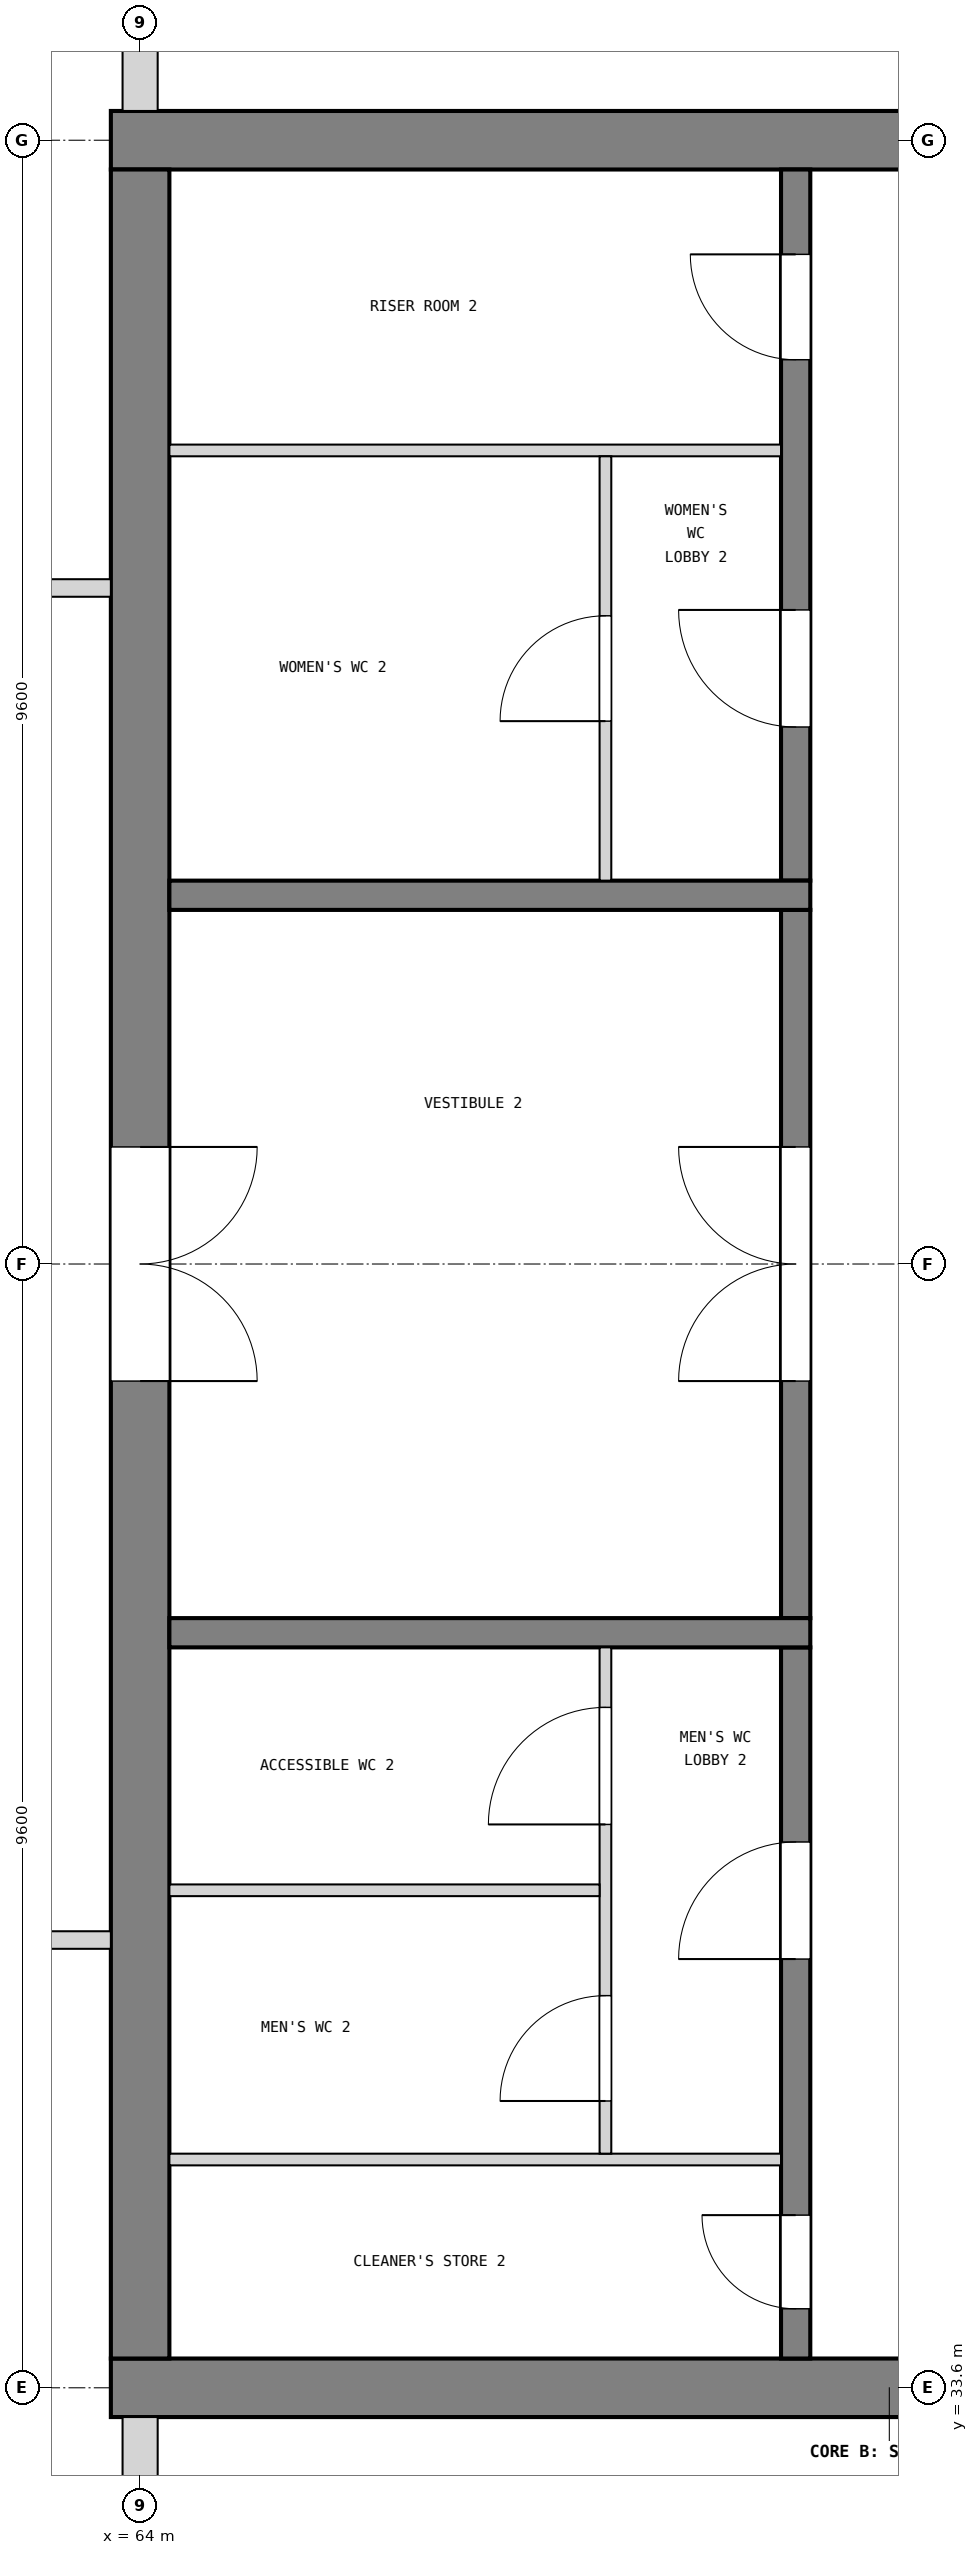
"""IFC4 building model, lengths in metres.
Left out: names, types, materials, properties, quantities, classifications, styles, units other than length and angle.
Written with IfcOpenShell. Run it as: python <this file> out.ifc"""

import sys

from ifc_helpers import new_model, si_unit, direction, frame, frame_2d, origin, place, context, subcontext, project, spatial, rectangle, extrude, element, fill, save


model = new_model("IFC4")
c1 = context("Model", 3, precision=1e-05, world=origin(), true_north=direction((0.0, 1.0)))
c2 = subcontext(c1, "Body", "Model", "MODEL_VIEW")
j1 = project(units=[si_unit("LENGTHUNIT", "METRE"), si_unit("PLANEANGLEUNIT", "RADIAN")], contexts=[c1])
p1 = place(None, origin())
s1 = spatial("IfcSite", under=j1, at=p1, CompositionType="ELEMENT")
p2 = place(p1, origin())
s2 = spatial("IfcBuilding", under=s1, at=p2, CompositionType="ELEMENT")
p3 = place(p2, frame((0.0, 0.0, 12.9)))
s3 = spatial("IfcBuildingStorey", under=s2, at=p3, CompositionType="ELEMENT", Elevation=12.9)
p4 = place(p3, frame((63.75, 52.8, 0.0), z_axis=(0.0, 0.0, 1.0), x_axis=(1.0, 0.0, 0.0)))
e1 = element("IfcWall", 1, at=p4, inside=s3, PredefinedType="SHEAR", context=c2, shape_type="SweptSolid", body=[
    extrude(rectangle(XDim=13.3, YDim=0.5, at=frame_2d((6.65, 0.0))), origin(), (0.0, 0.0, 1.0), 4.2),
])
p5 = place(p4, frame((11.05, 0.0, 1.0)))
e2 = element("IfcOpeningElement", 2, at=p5, cuts=e1, PredefinedType="OPENING", context=c2, shape_type="SweptSolid", body=[
    extrude(rectangle(XDim=0.4, YDim=2.0, at=frame_2d((0.2, 1.0))), frame((0.0, 0.26, 0.0), z_axis=(0.0, -1.0, 0.0), x_axis=(1.0, 0.0, 0.0)), (0.0, 0.0, 1.0), 0.52),
])
p6 = place(p3, frame((63.75, 33.6, 0.0), z_axis=(0.0, 0.0, 1.0), x_axis=(1.0, 0.0, 0.0)))
e3 = element("IfcWall", 3, at=p6, inside=s3, PredefinedType="SHEAR", context=c2, shape_type="SweptSolid", body=[
    extrude(rectangle(XDim=13.3, YDim=0.5, at=frame_2d((6.65, 0.0))), origin(), (0.0, 0.0, 1.0), 4.2),
])
p7 = place(p6, frame((11.05, 0.0, 1.0)))
e4 = element("IfcOpeningElement", 4, at=p7, cuts=e3, PredefinedType="OPENING", context=c2, shape_type="SweptSolid", body=[
    extrude(rectangle(XDim=0.4, YDim=2.0, at=frame_2d((0.2, 1.0))), frame((0.0, 0.26, 0.0), z_axis=(0.0, -1.0, 0.0), x_axis=(1.0, 0.0, 0.0)), (0.0, 0.0, 1.0), 0.52),
])
p8 = place(p3, frame((64.0, 33.85, 0.0), z_axis=(0.0, 0.0, 1.0), x_axis=(0.0, 1.0, 0.0)))
e5 = element("IfcWall", 5, at=p8, inside=s3, PredefinedType="SHEAR", context=c2, shape_type="SweptSolid", body=[
    extrude(rectangle(XDim=18.7, YDim=0.5, at=frame_2d((9.35, 0.0))), origin(), (0.0, 0.0, 1.0), 4.2),
])
p9 = place(p8, frame((8.35, 0.0, 0.0)))
e6 = element("IfcOpeningElement", 6, at=p9, cuts=e5, PredefinedType="OPENING", context=c2, shape_type="SweptSolid", body=[
    extrude(rectangle(XDim=2.0, YDim=2.1, at=frame_2d((1.0, 1.05))), frame((0.0, 0.26, 0.0), z_axis=(0.0, -1.0, 0.0), x_axis=(1.0, 0.0, 0.0)), (0.0, 0.0, 1.0), 0.52),
])
p10 = place(p3, frame((64.0, 31.0, 0.0), z_axis=(0.0, 0.0, 1.0), x_axis=(0.0, 1.0, 0.0)))
e7 = element("IfcWall", 7, at=p10, inside=s3, PredefinedType="SOLIDWALL", context=c2, shape_type="SweptSolid", body=[
    extrude(rectangle(XDim=2.35, YDim=0.3, at=frame_2d((1.175, 0.0))), origin(), (0.0, 0.0, 1.0), 3.18),
])
p11 = place(p3, frame((64.0, 53.05, 0.0), z_axis=(0.0, 0.0, 1.0), x_axis=(0.0, 1.0, 0.0)))
e8 = element("IfcWall", 8, at=p11, inside=s3, PredefinedType="SOLIDWALL", context=c2, shape_type="SweptSolid", body=[
    extrude(rectangle(XDim=2.35, YDim=0.3, at=frame_2d((1.175, 0.0))), origin(), (0.0, 0.0, 1.0), 3.18),
])
p12 = place(p3, frame((69.6, 33.85, 0.0), z_axis=(0.0, 0.0, 1.0), x_axis=(0.0, 1.0, 0.0)))
e9 = element("IfcWall", 9, at=p12, inside=s3, PredefinedType="SOLIDWALL", context=c2, shape_type="SweptSolid", body=[
    extrude(rectangle(XDim=6.075, YDim=0.25, at=frame_2d((3.038, 0.0))), origin(), (0.0, 0.0, 1.0), 3.9),
])
p13 = place(p12, frame((0.425, 0.0, 0.0)))
e10 = element("IfcOpeningElement", 10, at=p13, cuts=e9, PredefinedType="OPENING", context=c2, shape_type="SweptSolid", body=[
    extrude(rectangle(XDim=0.8, YDim=2.1, at=frame_2d((0.4, 1.05))), frame((0.0, 0.135, 0.0), z_axis=(0.0, -1.0, 0.0), x_axis=(1.0, 0.0, 0.0)), (0.0, 0.0, 1.0), 0.27),
])
p14 = place(p12, frame((3.413, 0.0, 0.0)))
e11 = element("IfcOpeningElement", 11, at=p14, cuts=e9, PredefinedType="OPENING", context=c2, shape_type="SweptSolid", body=[
    extrude(rectangle(XDim=1.0, YDim=2.1, at=frame_2d((0.5, 1.05))), frame((0.0, 0.135, 0.0), z_axis=(0.0, -1.0, 0.0), x_axis=(1.0, 0.0, 0.0)), (0.0, 0.0, 1.0), 0.27),
])
p15 = place(p3, frame((69.6, 40.175, 0.0), z_axis=(0.0, 0.0, 1.0), x_axis=(0.0, 1.0, 0.0)))
e12 = element("IfcWall", 12, at=p15, inside=s3, PredefinedType="SOLIDWALL", context=c2, shape_type="SweptSolid", body=[
    extrude(rectangle(XDim=6.05, YDim=0.25, at=frame_2d((3.025, 0.0))), origin(), (0.0, 0.0, 1.0), 3.9),
])
p16 = place(p15, frame((2.025, 0.0, 0.0)))
e13 = element("IfcOpeningElement", 13, at=p16, cuts=e12, PredefinedType="OPENING", context=c2, shape_type="SweptSolid", body=[
    extrude(rectangle(XDim=2.0, YDim=2.1, at=frame_2d((1.0, 1.05))), frame((0.0, 0.135, 0.0), z_axis=(0.0, -1.0, 0.0), x_axis=(1.0, 0.0, 0.0)), (0.0, 0.0, 1.0), 0.27),
])
p17 = place(p3, frame((69.6, 46.475, 0.0), z_axis=(0.0, 0.0, 1.0), x_axis=(0.0, 1.0, 0.0)))
e14 = element("IfcWall", 14, at=p17, inside=s3, PredefinedType="SOLIDWALL", context=c2, shape_type="SweptSolid", body=[
    extrude(rectangle(XDim=6.075, YDim=0.25, at=frame_2d((3.038, 0.0))), origin(), (0.0, 0.0, 1.0), 3.9),
])
p18 = place(p17, frame((1.312, 0.0, 0.0)))
e15 = element("IfcOpeningElement", 15, at=p18, cuts=e14, PredefinedType="OPENING", context=c2, shape_type="SweptSolid", body=[
    extrude(rectangle(XDim=1.0, YDim=2.1, at=frame_2d((0.5, 1.05))), frame((0.0, 0.135, 0.0), z_axis=(0.0, -1.0, 0.0), x_axis=(1.0, 0.0, 0.0)), (0.0, 0.0, 1.0), 0.27),
])
p19 = place(p17, frame((4.45, 0.0, 0.0)))
e16 = element("IfcOpeningElement", 16, at=p19, cuts=e14, PredefinedType="OPENING", context=c2, shape_type="SweptSolid", body=[
    extrude(rectangle(XDim=0.9, YDim=2.1, at=frame_2d((0.45, 1.05))), frame((0.0, 0.135, 0.0), z_axis=(0.0, -1.0, 0.0), x_axis=(1.0, 0.0, 0.0)), (0.0, 0.0, 1.0), 0.27),
])
for number, where, z_axis, x_axis in (
    (17, (69.725, 40.05, 0.0), (0.0, 0.0, 1.0), (-1.0, 0.0, 0.0)),
    (18, (69.725, 46.35, 0.0), (0.0, 0.0, 1.0), (-1.0, 0.0, 0.0)),
):
    element("IfcWall", number, at=place(p3, frame(where, z_axis=z_axis, x_axis=x_axis)), inside=s3, PredefinedType="SOLIDWALL", context=c2, shape_type="SweptSolid", body=[
        extrude(rectangle(XDim=5.475, YDim=0.25, at=frame_2d((2.738, 0.0))), origin(), (0.0, 0.0, 1.0), 3.9),
    ])
p20 = place(p3, frame((69.475, 35.55, 0.0), z_axis=(0.0, 0.0, 1.0), x_axis=(-1.0, 0.0, 0.0)))
e19 = element("IfcWall", 19, at=p20, inside=s3, PredefinedType="PARTITIONING", context=c2, shape_type="SweptSolid", body=[
    extrude(rectangle(XDim=5.225, YDim=0.1, at=frame_2d((2.613, 0.0))), origin(), (0.0, 0.0, 1.0), 3.9),
])
p21 = place(p3, frame((67.975, 35.6, 0.0), z_axis=(0.0, 0.0, 1.0), x_axis=(0.0, 1.0, 0.0)))
e20 = element("IfcWall", 20, at=p21, inside=s3, PredefinedType="PARTITIONING", context=c2, shape_type="SweptSolid", body=[
    extrude(rectangle(XDim=4.325, YDim=0.1, at=frame_2d((2.163, 0.0))), origin(), (0.0, 0.0, 1.0), 3.9),
])
p22 = place(p21, frame((0.45, 0.0, 0.0)))
e21 = element("IfcOpeningElement", 21, at=p22, cuts=e20, PredefinedType="OPENING", context=c2, shape_type="SweptSolid", body=[
    extrude(rectangle(XDim=0.9, YDim=2.1, at=frame_2d((0.45, 1.05))), frame((0.0, 0.06, 0.0), z_axis=(0.0, -1.0, 0.0), x_axis=(1.0, 0.0, 0.0)), (0.0, 0.0, 1.0), 0.12),
])
p23 = place(p21, frame((2.812, 0.0, 0.0)))
e22 = element("IfcOpeningElement", 22, at=p23, cuts=e20, PredefinedType="OPENING", context=c2, shape_type="SweptSolid", body=[
    extrude(rectangle(XDim=1.0, YDim=2.1, at=frame_2d((0.5, 1.05))), frame((0.0, 0.06, 0.0), z_axis=(0.0, -1.0, 0.0), x_axis=(1.0, 0.0, 0.0)), (0.0, 0.0, 1.0), 0.12),
])
p24 = place(p3, frame((67.925, 37.85, 0.0), z_axis=(0.0, 0.0, 1.0), x_axis=(-1.0, 0.0, 0.0)))
e23 = element("IfcWall", 23, at=p24, inside=s3, PredefinedType="PARTITIONING", context=c2, shape_type="SweptSolid", body=[
    extrude(rectangle(XDim=3.675, YDim=0.1, at=frame_2d((1.837, 0.0))), origin(), (0.0, 0.0, 1.0), 3.9),
])
p25 = place(p3, frame((69.475, 50.15, 0.0), z_axis=(0.0, 0.0, 1.0), x_axis=(-1.0, 0.0, 0.0)))
e24 = element("IfcWall", 24, at=p25, inside=s3, PredefinedType="PARTITIONING", context=c2, shape_type="SweptSolid", body=[
    extrude(rectangle(XDim=5.225, YDim=0.1, at=frame_2d((2.613, 0.0))), origin(), (0.0, 0.0, 1.0), 3.9),
])
p26 = place(p3, frame((67.975, 46.475, 0.0), z_axis=(0.0, 0.0, 1.0), x_axis=(0.0, 1.0, 0.0)))
e25 = element("IfcWall", 25, at=p26, inside=s3, PredefinedType="PARTITIONING", context=c2, shape_type="SweptSolid", body=[
    extrude(rectangle(XDim=3.625, YDim=0.1, at=frame_2d((1.812, 0.0))), origin(), (0.0, 0.0, 1.0), 3.9),
])
p27 = place(p26, frame((1.363, 0.0, 0.0)))
e26 = element("IfcOpeningElement", 26, at=p27, cuts=e25, PredefinedType="OPENING", context=c2, shape_type="SweptSolid", body=[
    extrude(rectangle(XDim=0.9, YDim=2.1, at=frame_2d((0.45, 1.05))), frame((0.0, 0.06, 0.0), z_axis=(0.0, -1.0, 0.0), x_axis=(1.0, 0.0, 0.0)), (0.0, 0.0, 1.0), 0.12),
])
p28 = place(p3, frame((57.78, 37.425, 0.0), z_axis=(0.0, 0.0, 1.0), x_axis=(1.0, 0.0, 0.0)))
e27 = element("IfcWall", 27, at=p28, inside=s3, PredefinedType="PARTITIONING", context=c2, shape_type="SweptSolid", body=[
    extrude(rectangle(XDim=5.97, YDim=0.15, at=frame_2d((2.985, 0.0))), origin(), (0.0, 0.0, 1.0), 3.98),
])
p29 = place(p28, frame((2.52, 0.0, 0.0)))
e28 = element("IfcOpeningElement", 28, at=p29, cuts=e27, PredefinedType="OPENING", context=c2, shape_type="SweptSolid", body=[
    extrude(rectangle(XDim=1.0, YDim=2.1, at=frame_2d((0.5, 1.05))), frame((0.0, 0.085, 0.0), z_axis=(0.0, -1.0, 0.0), x_axis=(1.0, 0.0, 0.0)), (0.0, 0.0, 1.0), 0.17),
])
p30 = place(p3, frame((54.4, 48.975, 0.0), z_axis=(0.0, 0.0, 1.0), x_axis=(1.0, 0.0, 0.0)))
e29 = element("IfcWall", 29, at=p30, inside=s3, PredefinedType="PARTITIONING", context=c2, shape_type="SweptSolid", body=[
    extrude(rectangle(XDim=9.35, YDim=0.15, at=frame_2d((4.675, 0.0))), origin(), (0.0, 0.0, 1.0), 3.98),
])
p31 = place(p30, frame((3.8, 0.0, 0.0)))
e30 = element("IfcOpeningElement", 30, at=p31, cuts=e29, PredefinedType="OPENING", context=c2, shape_type="SweptSolid", body=[
    extrude(rectangle(XDim=1.8, YDim=2.1, at=frame_2d((0.9, 1.05))), frame((0.0, 0.085, 0.0), z_axis=(0.0, -1.0, 0.0), x_axis=(1.0, 0.0, 0.0)), (0.0, 0.0, 1.0), 0.17),
])
p32 = place(p16, origin())
e31 = element("IfcDoor", 31, at=p32, inside=s3, OperationType="DOUBLE_DOOR_SINGLE_SWING", PredefinedType="DOOR", context=c2, shape_type="SweptSolid", body=[
    extrude(rectangle(XDim=2.0, YDim=2.1, at=frame_2d((1.0, 1.05))), frame((0.0, 0.025, 0.0), z_axis=(0.0, -1.0, 0.0), x_axis=(1.0, 0.0, 0.0)), (0.0, 0.0, 1.0), 0.05),
])
fill(e13, e31)
p33 = place(p9, frame((2.0, 0.0, 0.0), z_axis=(0.0, 0.0, 1.0), x_axis=(-1.0, 0.0, 0.0)))
e32 = element("IfcDoor", 32, at=p33, inside=s3, OperationType="DOUBLE_DOOR_SINGLE_SWING", PredefinedType="DOOR", context=c2, shape_type="SweptSolid", body=[
    extrude(rectangle(XDim=2.0, YDim=2.1, at=frame_2d((1.0, 1.05))), frame((0.0, 0.025, 0.0), z_axis=(0.0, -1.0, 0.0), x_axis=(1.0, 0.0, 0.0)), (0.0, 0.0, 1.0), 0.05),
])
fill(e6, e32)
p34 = place(p13, origin())
e33 = element("IfcDoor", 33, at=p34, inside=s3, OperationType="SINGLE_SWING_RIGHT", PredefinedType="DOOR", context=c2, shape_type="SweptSolid", body=[
    extrude(rectangle(XDim=0.8, YDim=2.1, at=frame_2d((0.4, 1.05))), frame((0.0, 0.025, 0.0), z_axis=(0.0, -1.0, 0.0), x_axis=(1.0, 0.0, 0.0)), (0.0, 0.0, 1.0), 0.05),
])
fill(e10, e33)
p35 = place(p14, origin())
e34 = element("IfcDoor", 34, at=p35, inside=s3, OperationType="SINGLE_SWING_LEFT", PredefinedType="DOOR", context=c2, shape_type="SweptSolid", body=[
    extrude(rectangle(XDim=1.0, YDim=2.1, at=frame_2d((0.5, 1.05))), frame((0.0, 0.025, 0.0), z_axis=(0.0, -1.0, 0.0), x_axis=(1.0, 0.0, 0.0)), (0.0, 0.0, 1.0), 0.05),
])
fill(e11, e34)
p36 = place(p22, origin())
e35 = element("IfcDoor", 35, at=p36, inside=s3, OperationType="SINGLE_SWING_LEFT", PredefinedType="DOOR", context=c2, shape_type="SweptSolid", body=[
    extrude(rectangle(XDim=0.9, YDim=2.1, at=frame_2d((0.45, 1.05))), frame((0.0, 0.025, 0.0), z_axis=(0.0, -1.0, 0.0), x_axis=(1.0, 0.0, 0.0)), (0.0, 0.0, 1.0), 0.05),
])
fill(e21, e35)
p37 = place(p23, origin())
e36 = element("IfcDoor", 36, at=p37, inside=s3, OperationType="SINGLE_SWING_LEFT", PredefinedType="DOOR", context=c2, shape_type="SweptSolid", body=[
    extrude(rectangle(XDim=1.0, YDim=2.1, at=frame_2d((0.5, 1.05))), frame((0.0, 0.025, 0.0), z_axis=(0.0, -1.0, 0.0), x_axis=(1.0, 0.0, 0.0)), (0.0, 0.0, 1.0), 0.05),
])
fill(e22, e36)
p38 = place(p18, origin())
e37 = element("IfcDoor", 37, at=p38, inside=s3, OperationType="SINGLE_SWING_RIGHT", PredefinedType="DOOR", context=c2, shape_type="SweptSolid", body=[
    extrude(rectangle(XDim=1.0, YDim=2.1, at=frame_2d((0.5, 1.05))), frame((0.0, 0.025, 0.0), z_axis=(0.0, -1.0, 0.0), x_axis=(1.0, 0.0, 0.0)), (0.0, 0.0, 1.0), 0.05),
])
fill(e15, e37)
p39 = place(p27, origin())
e38 = element("IfcDoor", 38, at=p39, inside=s3, OperationType="SINGLE_SWING_LEFT", PredefinedType="DOOR", context=c2, shape_type="SweptSolid", body=[
    extrude(rectangle(XDim=0.9, YDim=2.1, at=frame_2d((0.45, 1.05))), frame((0.0, 0.025, 0.0), z_axis=(0.0, -1.0, 0.0), x_axis=(1.0, 0.0, 0.0)), (0.0, 0.0, 1.0), 0.05),
])
fill(e26, e38)
p40 = place(p19, origin())
e39 = element("IfcDoor", 39, at=p40, inside=s3, OperationType="SINGLE_SWING_RIGHT", PredefinedType="DOOR", context=c2, shape_type="SweptSolid", body=[
    extrude(rectangle(XDim=0.9, YDim=2.1, at=frame_2d((0.45, 1.05))), frame((0.0, 0.025, 0.0), z_axis=(0.0, -1.0, 0.0), x_axis=(1.0, 0.0, 0.0)), (0.0, 0.0, 1.0), 0.05),
])
fill(e16, e39)
save(model, sys.argv[1])
